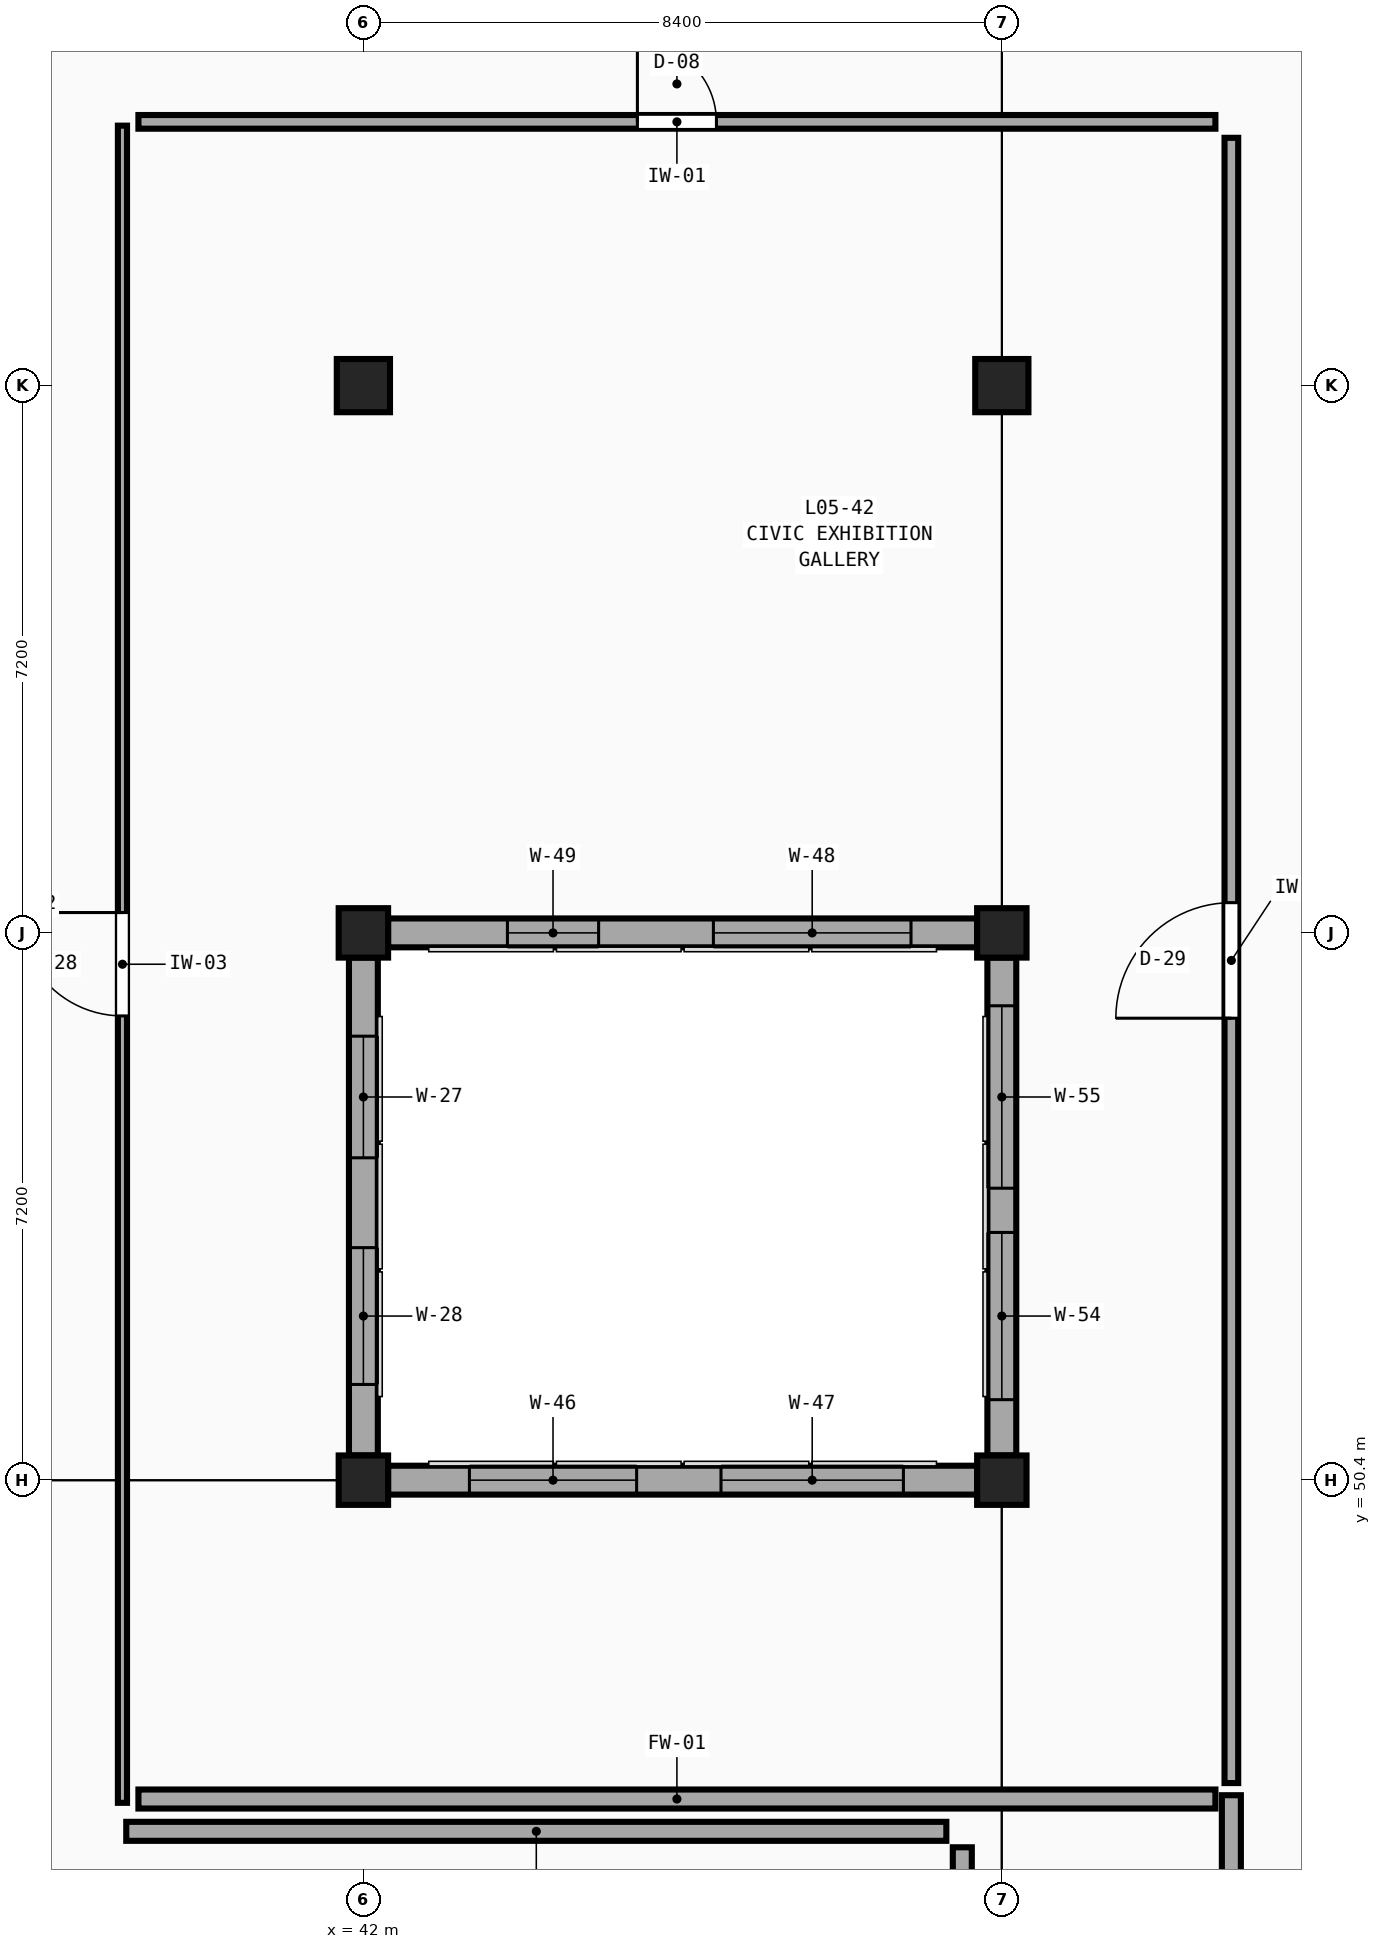
"""IFC4 building model, lengths in metres.
Left out: names, types, materials, properties, quantities, classifications, styles, units other than length and angle.
Written with IfcOpenShell. Run it as: python <this file> out.ifc"""

import sys

from ifc_helpers import new_model, si_unit, direction, frame, frame_2d, origin, origin_2d, place, context, subcontext, project, spatial, rectangle, extrude, element, fill, save


model = new_model("IFC4")
c1 = context("Model", 3, precision=1e-05, world=origin(), true_north=direction((0.0, 1.0)))
c2 = subcontext(c1, "Body", "Model", "MODEL_VIEW")
j1 = project(units=[si_unit("LENGTHUNIT", "METRE"), si_unit("PLANEANGLEUNIT", "RADIAN")], contexts=[c1])
p1 = place(None, origin())
s1 = spatial("IfcSite", under=j1, at=p1, CompositionType="ELEMENT")
p2 = place(p1, origin())
s2 = spatial("IfcBuilding", under=s1, at=p2, CompositionType="ELEMENT")
p3 = place(p2, frame((0.0, 0.0, 23.4)))
s3 = spatial("IfcBuildingStorey", under=s2, at=p3, CompositionType="ELEMENT", Elevation=23.4)
for number, where, z_axis, x_axis in (
    (1, (42.0, 50.4, 0.0), (0.0, 0.0, 1.0), (1.0, 0.0, 0.0)),
    (2, (42.0, 57.6, 0.0), (0.0, 0.0, 1.0), (1.0, 0.0, 0.0)),
):
    element("IfcColumn", number, at=place(p3, frame(where, z_axis=z_axis, x_axis=x_axis)), inside=s3, PredefinedType="COLUMN", context=c2, shape_type="SweptSolid", body=[
        extrude(rectangle(XDim=0.65, YDim=0.65, at=origin_2d()), origin(), (0.0, 0.0, 1.0), 4.5),
    ])
p4 = place(p3, frame((42.0, 64.8, 0.0), z_axis=(0.0, 0.0, 1.0), x_axis=(1.0, 0.0, 0.0)))
e3 = element("IfcColumn", 3, at=p4, inside=s3, PredefinedType="COLUMN", context=c2, shape_type="SweptSolid", body=[
    extrude(rectangle(XDim=0.7, YDim=0.7, at=origin_2d()), origin(), (0.0, 0.0, 1.0), 4.5),
])
for number, where, z_axis, x_axis in (
    (4, (50.4, 50.4, 0.0), (0.0, 0.0, 1.0), (1.0, 0.0, 0.0)),
    (5, (50.4, 57.6, 0.0), (0.0, 0.0, 1.0), (1.0, 0.0, 0.0)),
):
    element("IfcColumn", number, at=place(p3, frame(where, z_axis=z_axis, x_axis=x_axis)), inside=s3, PredefinedType="COLUMN", context=c2, shape_type="SweptSolid", body=[
        extrude(rectangle(XDim=0.65, YDim=0.65, at=origin_2d()), origin(), (0.0, 0.0, 1.0), 4.5),
    ])
p5 = place(p3, frame((50.4, 64.8, 0.0), z_axis=(0.0, 0.0, 1.0), x_axis=(1.0, 0.0, 0.0)))
e6 = element("IfcColumn", 6, at=p5, inside=s3, PredefinedType="COLUMN", context=c2, shape_type="SweptSolid", body=[
    extrude(rectangle(XDim=0.7, YDim=0.7, at=origin_2d()), origin(), (0.0, 0.0, 1.0), 4.5),
])
p6 = place(p3, frame((42.0, 57.275, 0.0), z_axis=(0.0, 0.0, 1.0), x_axis=(0.0, -1.0, 0.0)))
e7 = element("IfcWall", 7, at=p6, inside=s3, PredefinedType="SOLIDWALL", context=c2, shape_type="SweptSolid", body=[
    extrude(rectangle(XDim=6.55, YDim=0.38, at=frame_2d((3.275, 0.0))), origin(), (0.0, 0.0, 1.0), 3.66),
])
p7 = place(p6, frame((1.034, 0.0, 0.75)))
e8 = element("IfcOpeningElement", 8, at=p7, cuts=e7, PredefinedType="OPENING", context=c2, shape_type="SweptSolid", body=[
    extrude(rectangle(XDim=1.6, YDim=2.44, at=frame_2d((0.8, 1.22))), frame((0.0, 0.21, 0.0), z_axis=(0.0, -1.0, 0.0), x_axis=(1.0, 0.0, 0.0)), (0.0, 0.0, 1.0), 0.42),
])
p8 = place(p6, frame((3.816, 0.0, 0.75)))
e9 = element("IfcOpeningElement", 9, at=p8, cuts=e7, PredefinedType="OPENING", context=c2, shape_type="SweptSolid", body=[
    extrude(rectangle(XDim=1.8, YDim=2.44, at=frame_2d((0.9, 1.22))), frame((0.0, 0.21, 0.0), z_axis=(0.0, -1.0, 0.0), x_axis=(1.0, 0.0, 0.0)), (0.0, 0.0, 1.0), 0.42),
])
p9 = place(p3, frame((42.325, 50.4, 0.0), z_axis=(0.0, 0.0, 1.0), x_axis=(1.0, 0.0, 0.0)))
e10 = element("IfcWall", 10, at=p9, inside=s3, PredefinedType="SOLIDWALL", context=c2, shape_type="SweptSolid", body=[
    extrude(rectangle(XDim=7.75, YDim=0.38, at=frame_2d((3.875, 0.0))), origin(), (0.0, 0.0, 1.0), 3.66),
])
p10 = place(p9, frame((1.07, 0.0, 0.75)))
e11 = element("IfcOpeningElement", 11, at=p10, cuts=e10, PredefinedType="OPENING", context=c2, shape_type="SweptSolid", body=[
    extrude(rectangle(XDim=2.2, YDim=2.76, at=frame_2d((1.1, 1.38))), frame((0.0, 0.21, 0.0), z_axis=(0.0, -1.0, 0.0), x_axis=(1.0, 0.0, 0.0)), (0.0, 0.0, 1.0), 0.42),
])
p11 = place(p9, frame((4.38, 0.0, 0.75)))
e12 = element("IfcOpeningElement", 12, at=p11, cuts=e10, PredefinedType="OPENING", context=c2, shape_type="SweptSolid", body=[
    extrude(rectangle(XDim=2.4, YDim=2.76, at=frame_2d((1.2, 1.38))), frame((0.0, 0.21, 0.0), z_axis=(0.0, -1.0, 0.0), x_axis=(1.0, 0.0, 0.0)), (0.0, 0.0, 1.0), 0.42),
])
p12 = place(p3, frame((50.075, 57.6, 0.0), z_axis=(0.0, 0.0, 1.0), x_axis=(-1.0, 0.0, 0.0)))
e13 = element("IfcWall", 13, at=p12, inside=s3, PredefinedType="SOLIDWALL", context=c2, shape_type="SweptSolid", body=[
    extrude(rectangle(XDim=7.75, YDim=0.38, at=frame_2d((3.875, 0.0))), origin(), (0.0, 0.0, 1.0), 3.66),
])
p13 = place(p12, frame((0.87, 0.0, 0.75)))
e14 = element("IfcOpeningElement", 14, at=p13, cuts=e13, PredefinedType="OPENING", context=c2, shape_type="SweptSolid", body=[
    extrude(rectangle(XDim=2.6, YDim=2.76, at=frame_2d((1.3, 1.38))), frame((0.0, 0.21, 0.0), z_axis=(0.0, -1.0, 0.0), x_axis=(1.0, 0.0, 0.0)), (0.0, 0.0, 1.0), 0.42),
])
p14 = place(p12, frame((4.98, 0.0, 0.75)))
e15 = element("IfcOpeningElement", 15, at=p14, cuts=e13, PredefinedType="OPENING", context=c2, shape_type="SweptSolid", body=[
    extrude(rectangle(XDim=1.2, YDim=2.76, at=frame_2d((0.6, 1.38))), frame((0.0, 0.21, 0.0), z_axis=(0.0, -1.0, 0.0), x_axis=(1.0, 0.0, 0.0)), (0.0, 0.0, 1.0), 0.42),
])
p15 = place(p3, frame((50.4, 50.725, 0.0), z_axis=(0.0, 0.0, 1.0), x_axis=(0.0, 1.0, 0.0)))
e16 = element("IfcWall", 16, at=p15, inside=s3, PredefinedType="SOLIDWALL", context=c2, shape_type="SweptSolid", body=[
    extrude(rectangle(XDim=6.55, YDim=0.38, at=frame_2d((3.275, 0.0))), origin(), (0.0, 0.0, 1.0), 3.66),
])
p16 = place(p15, frame((0.734, 0.0, 0.75)))
e17 = element("IfcOpeningElement", 17, at=p16, cuts=e16, PredefinedType="OPENING", context=c2, shape_type="SweptSolid", body=[
    extrude(rectangle(XDim=2.2, YDim=2.76, at=frame_2d((1.1, 1.38))), frame((0.0, 0.21, 0.0), z_axis=(0.0, -1.0, 0.0), x_axis=(1.0, 0.0, 0.0)), (0.0, 0.0, 1.0), 0.42),
])
p17 = place(p15, frame((3.516, 0.0, 0.75)))
e18 = element("IfcOpeningElement", 18, at=p17, cuts=e16, PredefinedType="OPENING", context=c2, shape_type="SweptSolid", body=[
    extrude(rectangle(XDim=2.4, YDim=2.76, at=frame_2d((1.2, 1.38))), frame((0.0, 0.21, 0.0), z_axis=(0.0, -1.0, 0.0), x_axis=(1.0, 0.0, 0.0)), (0.0, 0.0, 1.0), 0.42),
])
p18 = place(p3, frame((38.83, 46.155, 0.0), z_axis=(0.0, 0.0, 1.0), x_axis=(0.0, 1.0, 0.0)))
e19 = element("IfcWall", 19, at=p18, inside=s3, PredefinedType="PARTITIONING", context=c2, shape_type="SweptSolid", body=[
    extrude(rectangle(XDim=22.065, YDim=0.12, at=frame_2d((11.032, 0.0))), origin(), (0.0, 0.0, 1.0), 4.21),
])
p19 = place(p18, frame((10.353, 0.0, 0.0)))
e20 = element("IfcOpeningElement", 20, at=p19, cuts=e19, PredefinedType="OPENING", context=c2, shape_type="SweptSolid", body=[
    extrude(rectangle(XDim=1.36, YDim=2.37, at=frame_2d((0.68, 1.185))), frame((0.0, 0.08, 0.0), z_axis=(0.0, -1.0, 0.0), x_axis=(1.0, 0.0, 0.0)), (0.0, 0.0, 1.0), 0.16),
])
p20 = place(p3, frame((53.42, 46.415, 0.0), z_axis=(0.0, 0.0, 1.0), x_axis=(0.0, 1.0, 0.0)))
e21 = element("IfcWall", 21, at=p20, inside=s3, PredefinedType="PARTITIONING", context=c2, shape_type="SweptSolid", body=[
    extrude(rectangle(XDim=21.645, YDim=0.18, at=frame_2d((10.823, 0.0))), origin(), (0.0, 0.0, 1.0), 4.21),
])
p21 = place(p20, frame((10.062, 0.0, 0.0)))
e22 = element("IfcOpeningElement", 22, at=p21, cuts=e21, PredefinedType="OPENING", context=c2, shape_type="SweptSolid", body=[
    extrude(rectangle(XDim=1.52, YDim=2.37, at=frame_2d((0.76, 1.185))), frame((0.0, 0.11, 0.0), z_axis=(0.0, -1.0, 0.0), x_axis=(1.0, 0.0, 0.0)), (0.0, 0.0, 1.0), 0.22),
])
p22 = place(p3, frame((39.04, 68.27, 0.0), z_axis=(0.0, 0.0, 1.0), x_axis=(1.0, 0.0, 0.0)))
e23 = element("IfcWall", 23, at=p22, inside=s3, PredefinedType="PARTITIONING", context=c2, shape_type="SweptSolid", body=[
    extrude(rectangle(XDim=14.17, YDim=0.18, at=frame_2d((7.085, 0.0))), origin(), (0.0, 0.0, 1.0), 4.21),
])
p23 = place(p22, frame((6.565, 0.0, 0.0)))
e24 = element("IfcOpeningElement", 24, at=p23, cuts=e23, PredefinedType="OPENING", context=c2, shape_type="SweptSolid", body=[
    extrude(rectangle(XDim=1.04, YDim=2.13, at=frame_2d((0.52, 1.065))), frame((0.0, 0.11, 0.0), z_axis=(0.0, -1.0, 0.0), x_axis=(1.0, 0.0, 0.0)), (0.0, 0.0, 1.0), 0.22),
])
p24 = place(p3, frame((38.88, 45.78, 0.0), z_axis=(0.0, 0.0, 1.0), x_axis=(1.0, 0.0, 0.0)))
e25 = element("IfcWall", 25, at=p24, inside=s3, PredefinedType="SOLIDWALL", context=c2, shape_type="SweptSolid", body=[
    extrude(rectangle(XDim=10.79, YDim=0.25, at=frame_2d((5.395, 0.0))), origin(), (0.0, 0.0, 1.0), 4.21),
])
p25 = place(p3, frame((53.42, 36.37, 0.0), z_axis=(0.0, 0.0, 1.0), x_axis=(0.0, 1.0, 0.0)))
e26 = element("IfcWall", 26, at=p25, inside=s3, PredefinedType="SOLIDWALL", context=c2, shape_type="SweptSolid", body=[
    extrude(rectangle(XDim=9.885, YDim=0.25, at=frame_2d((4.942, 0.0))), origin(), (0.0, 0.0, 1.0), 4.21),
])
p26 = place(p25, frame((4.417, 0.0, 0.0)))
e27 = element("IfcOpeningElement", 27, at=p26, cuts=e26, PredefinedType="OPENING", context=c2, shape_type="SweptSolid", body=[
    extrude(rectangle(XDim=1.05, YDim=2.15, at=frame_2d((0.525, 1.075))), frame((0.0, 0.145, 0.0), z_axis=(0.0, -1.0, 0.0), x_axis=(1.0, 0.0, 0.0)), (0.0, 0.0, 1.0), 0.29),
])
p27 = place(p3, frame((49.88, 43.78, 0.0), z_axis=(0.0, 0.0, 1.0), x_axis=(0.0, 1.0, 0.0)))
e28 = element("IfcWall", 28, at=p27, inside=s3, PredefinedType="SOLIDWALL", context=c2, shape_type="SweptSolid", body=[
    extrude(rectangle(XDim=1.79, YDim=0.25, at=frame_2d((0.895, 0.0))), origin(), (0.0, 0.0, 1.0), 3.76),
])
p28 = place(p3, frame((39.04, 46.205, 0.0), z_axis=(0.0, 0.0, 1.0), x_axis=(1.0, 0.0, 0.0)))
e29 = element("IfcWall", 29, at=p28, inside=s3, PredefinedType="SOLIDWALL", context=c2, shape_type="SweptSolid", body=[
    extrude(rectangle(XDim=14.17, YDim=0.25, at=frame_2d((7.085, 0.0))), origin(), (0.0, 0.0, 1.0), 4.21),
])
p29 = place(p7, origin())
e30 = element("IfcWindow", 30, at=p29, inside=s3, PartitioningType="DOUBLE_PANEL_VERTICAL", PredefinedType="WINDOW", context=c2, shape_type="SweptSolid", body=[
    extrude(rectangle(XDim=1.6, YDim=2.44, at=frame_2d((0.8, 1.22))), frame((0.0, 0.03, 0.0), z_axis=(0.0, -1.0, 0.0), x_axis=(1.0, 0.0, 0.0)), (0.0, 0.0, 1.0), 0.06),
])
fill(e8, e30)
p30 = place(p8, origin())
e31 = element("IfcWindow", 31, at=p30, inside=s3, PartitioningType="DOUBLE_PANEL_VERTICAL", PredefinedType="WINDOW", context=c2, shape_type="SweptSolid", body=[
    extrude(rectangle(XDim=1.8, YDim=2.44, at=frame_2d((0.9, 1.22))), frame((0.0, 0.03, 0.0), z_axis=(0.0, -1.0, 0.0), x_axis=(1.0, 0.0, 0.0)), (0.0, 0.0, 1.0), 0.06),
])
fill(e9, e31)
p31 = place(p10, origin())
e32 = element("IfcWindow", 32, at=p31, inside=s3, PartitioningType="TRIPLE_PANEL_VERTICAL", PredefinedType="WINDOW", context=c2, shape_type="SweptSolid", body=[
    extrude(rectangle(XDim=2.2, YDim=2.76, at=frame_2d((1.1, 1.38))), frame((0.0, 0.03, 0.0), z_axis=(0.0, -1.0, 0.0), x_axis=(1.0, 0.0, 0.0)), (0.0, 0.0, 1.0), 0.06),
])
fill(e11, e32)
p32 = place(p11, origin())
e33 = element("IfcWindow", 33, at=p32, inside=s3, PartitioningType="TRIPLE_PANEL_VERTICAL", PredefinedType="WINDOW", context=c2, shape_type="SweptSolid", body=[
    extrude(rectangle(XDim=2.4, YDim=2.76, at=frame_2d((1.2, 1.38))), frame((0.0, 0.03, 0.0), z_axis=(0.0, -1.0, 0.0), x_axis=(1.0, 0.0, 0.0)), (0.0, 0.0, 1.0), 0.06),
])
fill(e12, e33)
p33 = place(p13, origin())
e34 = element("IfcWindow", 34, at=p33, inside=s3, PartitioningType="TRIPLE_PANEL_VERTICAL", PredefinedType="WINDOW", context=c2, shape_type="SweptSolid", body=[
    extrude(rectangle(XDim=2.6, YDim=2.76, at=frame_2d((1.3, 1.38))), frame((0.0, 0.03, 0.0), z_axis=(0.0, -1.0, 0.0), x_axis=(1.0, 0.0, 0.0)), (0.0, 0.0, 1.0), 0.06),
])
fill(e14, e34)
p34 = place(p14, origin())
e35 = element("IfcWindow", 35, at=p34, inside=s3, PartitioningType="SINGLE_PANEL", PredefinedType="WINDOW", context=c2, shape_type="SweptSolid", body=[
    extrude(rectangle(XDim=1.2, YDim=2.76, at=frame_2d((0.6, 1.38))), frame((0.0, 0.03, 0.0), z_axis=(0.0, -1.0, 0.0), x_axis=(1.0, 0.0, 0.0)), (0.0, 0.0, 1.0), 0.06),
])
fill(e15, e35)
p35 = place(p16, origin())
e36 = element("IfcWindow", 36, at=p35, inside=s3, PartitioningType="TRIPLE_PANEL_VERTICAL", PredefinedType="WINDOW", context=c2, shape_type="SweptSolid", body=[
    extrude(rectangle(XDim=2.2, YDim=2.76, at=frame_2d((1.1, 1.38))), frame((0.0, 0.03, 0.0), z_axis=(0.0, -1.0, 0.0), x_axis=(1.0, 0.0, 0.0)), (0.0, 0.0, 1.0), 0.06),
])
fill(e17, e36)
p36 = place(p17, origin())
e37 = element("IfcWindow", 37, at=p36, inside=s3, PartitioningType="TRIPLE_PANEL_VERTICAL", PredefinedType="WINDOW", context=c2, shape_type="SweptSolid", body=[
    extrude(rectangle(XDim=2.4, YDim=2.76, at=frame_2d((1.2, 1.38))), frame((0.0, 0.03, 0.0), z_axis=(0.0, -1.0, 0.0), x_axis=(1.0, 0.0, 0.0)), (0.0, 0.0, 1.0), 0.06),
])
fill(e18, e37)
p37 = place(p19, origin())
e38 = element("IfcDoor", 38, at=p37, inside=s3, OperationType="SINGLE_SWING_RIGHT", PredefinedType="DOOR", context=c2, shape_type="SweptSolid", body=[
    extrude(rectangle(XDim=1.36, YDim=2.37, at=frame_2d((0.68, 1.185))), frame((0.0, 0.025, 0.0), z_axis=(0.0, -1.0, 0.0), x_axis=(1.0, 0.0, 0.0)), (0.0, 0.0, 1.0), 0.05),
])
fill(e20, e38)
p38 = place(p21, origin())
e39 = element("IfcDoor", 39, at=p38, inside=s3, OperationType="SINGLE_SWING_LEFT", PredefinedType="DOOR", context=c2, shape_type="SweptSolid", body=[
    extrude(rectangle(XDim=1.52, YDim=2.37, at=frame_2d((0.76, 1.185))), frame((0.0, 0.025, 0.0), z_axis=(0.0, -1.0, 0.0), x_axis=(1.0, 0.0, 0.0)), (0.0, 0.0, 1.0), 0.05),
])
fill(e22, e39)
p39 = place(p23, origin())
e40 = element("IfcDoor", 40, at=p39, inside=s3, OperationType="SINGLE_SWING_LEFT", PredefinedType="DOOR", context=c2, shape_type="SweptSolid", body=[
    extrude(rectangle(XDim=1.04, YDim=2.13, at=frame_2d((0.52, 1.065))), frame((0.0, 0.025, 0.0), z_axis=(0.0, -1.0, 0.0), x_axis=(1.0, 0.0, 0.0)), (0.0, 0.0, 1.0), 0.05),
])
fill(e24, e40)
save(model, sys.argv[1])
